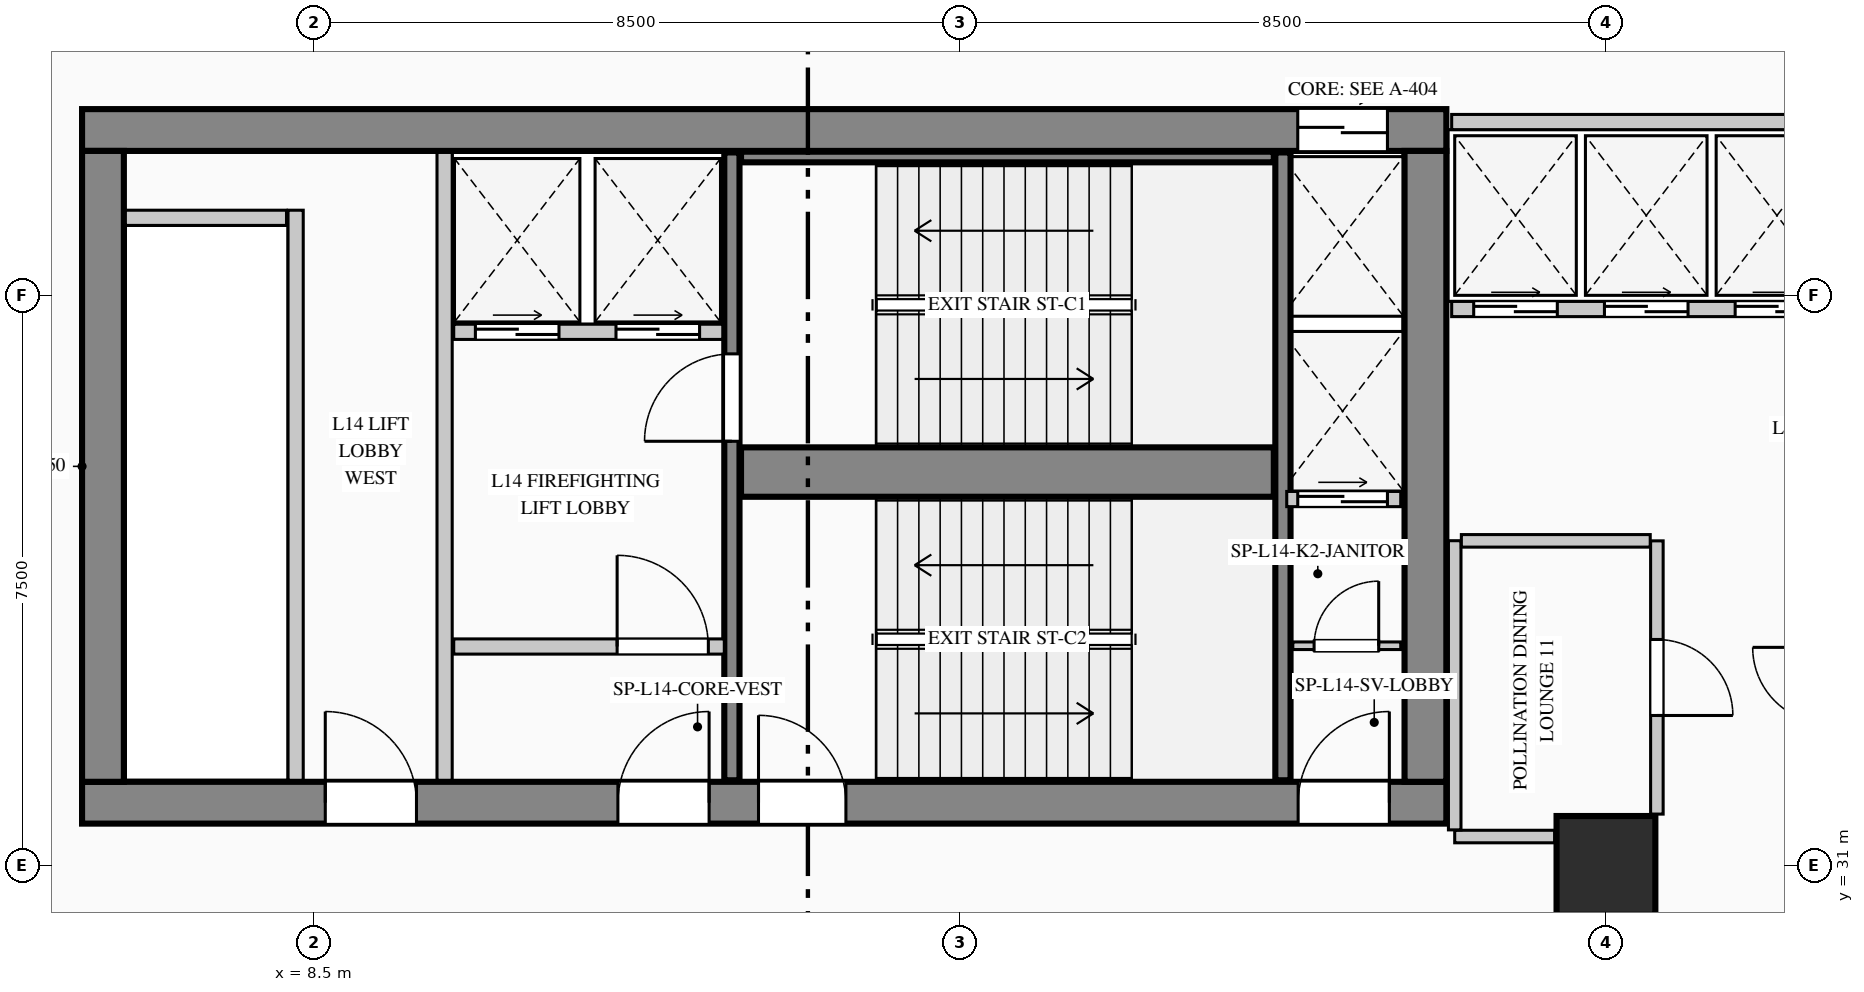
"""IFC4 building model, lengths in metres.
Left out: names, types, materials, properties, quantities, classifications, styles, units other than length and angle.
Written with IfcOpenShell. Run it as: python <this file> out.ifc"""

import sys

from ifc_helpers import new_model, si_unit, direction, frame, frame_2d, origin, origin_2d, place, context, subcontext, project, spatial, rectangle, extrude, element, fill, save


model = new_model("IFC4")
c1 = context("Model", 3, precision=1e-05, world=origin(), true_north=direction((0.0, 1.0)))
c2 = subcontext(c1, "Body", "Model", "MODEL_VIEW")
j1 = project(units=[si_unit("LENGTHUNIT", "METRE"), si_unit("PLANEANGLEUNIT", "RADIAN")], contexts=[c1])
p1 = place(None, origin())
s1 = spatial("IfcSite", under=j1, at=p1, CompositionType="ELEMENT")
p2 = place(p1, origin())
s2 = spatial("IfcBuilding", under=s1, at=p2, CompositionType="ELEMENT")
p3 = place(p2, frame((0.0, 0.0, 62.2)))
s3 = spatial("IfcBuildingStorey", under=s2, at=p3, CompositionType="ELEMENT", Elevation=62.2)
p4 = place(p3, frame((5.45, 40.675, 0.0), z_axis=(0.0, 0.0, 1.0), x_axis=(1.0, 0.0, 0.0)))
e1 = element("IfcWall", 1, at=p4, inside=s3, PredefinedType="SHEAR", context=c2, shape_type="SweptSolid", body=[
    extrude(rectangle(XDim=17.95, YDim=0.55, at=frame_2d((8.975, 0.0))), origin(), (0.0, 0.0, 1.0), 4.4),
])
p5 = place(p4, frame((15.995, 0.0, 0.0)))
e2 = element("IfcOpeningElement", 2, at=p5, cuts=e1, PredefinedType="OPENING", context=c2, shape_type="SweptSolid", body=[
    extrude(rectangle(XDim=1.18, YDim=2.25, at=frame_2d((0.59, 1.125))), frame((0.0, 0.285, 0.0), z_axis=(0.0, -1.0, 0.0), x_axis=(1.0, 0.0, 0.0)), (0.0, 0.0, 1.0), 0.57),
])
p6 = place(p3, frame((5.45, 31.825, 0.0), z_axis=(0.0, 0.0, 1.0), x_axis=(1.0, 0.0, 0.0)))
e3 = element("IfcWall", 3, at=p6, inside=s3, PredefinedType="SHEAR", context=c2, shape_type="SweptSolid", body=[
    extrude(rectangle(XDim=17.95, YDim=0.55, at=frame_2d((8.975, 0.0))), origin(), (0.0, 0.0, 1.0), 4.4),
])
p7 = place(p6, frame((3.2, 0.0, 0.0)))
e4 = element("IfcOpeningElement", 4, at=p7, cuts=e3, PredefinedType="OPENING", context=c2, shape_type="SweptSolid", body=[
    extrude(rectangle(XDim=1.2, YDim=2.2, at=frame_2d((0.6, 1.1))), frame((0.0, 0.285, 0.0), z_axis=(0.0, -1.0, 0.0), x_axis=(1.0, 0.0, 0.0)), (0.0, 0.0, 1.0), 0.57),
])
p8 = place(p6, frame((7.05, 0.0, 0.0)))
e5 = element("IfcOpeningElement", 5, at=p8, cuts=e3, PredefinedType="OPENING", context=c2, shape_type="SweptSolid", body=[
    extrude(rectangle(XDim=1.2, YDim=2.2, at=frame_2d((0.6, 1.1))), frame((0.0, 0.285, 0.0), z_axis=(0.0, -1.0, 0.0), x_axis=(1.0, 0.0, 0.0)), (0.0, 0.0, 1.0), 0.57),
])
p9 = place(p6, frame((8.9, 0.0, 0.0)))
e6 = element("IfcOpeningElement", 6, at=p9, cuts=e3, PredefinedType="OPENING", context=c2, shape_type="SweptSolid", body=[
    extrude(rectangle(XDim=1.15, YDim=2.2, at=frame_2d((0.575, 1.1))), frame((0.0, 0.285, 0.0), z_axis=(0.0, -1.0, 0.0), x_axis=(1.0, 0.0, 0.0)), (0.0, 0.0, 1.0), 0.57),
])
p10 = place(p6, frame((16.0, 0.0, 0.0)))
e7 = element("IfcOpeningElement", 7, at=p10, cuts=e3, PredefinedType="OPENING", context=c2, shape_type="SweptSolid", body=[
    extrude(rectangle(XDim=1.2, YDim=2.2, at=frame_2d((0.6, 1.1))), frame((0.0, 0.285, 0.0), z_axis=(0.0, -1.0, 0.0), x_axis=(1.0, 0.0, 0.0)), (0.0, 0.0, 1.0), 0.57),
])
for number, where, z_axis, x_axis in (
    (8, (5.725, 32.1, 0.0), (0.0, 0.0, 1.0), (0.0, 1.0, 0.0)),
    (9, (23.125, 32.1, 0.0), (0.0, 0.0, 1.0), (0.0, 1.0, 0.0)),
):
    element("IfcWall", number, at=place(p3, frame(where, z_axis=z_axis, x_axis=x_axis)), inside=s3, PredefinedType="SHEAR", context=c2, shape_type="SweptSolid", body=[
        extrude(rectangle(XDim=8.3, YDim=0.55, at=frame_2d((4.15, 0.0))), origin(), (0.0, 0.0, 1.0), 4.4),
    ])
p11 = place(p3, frame((14.0, 32.12, 0.0), z_axis=(0.0, 0.0, 1.0), x_axis=(0.0, 1.0, 0.0)))
e10 = element("IfcWall", 10, at=p11, inside=s3, PredefinedType="SHEAR", context=c2, shape_type="SweptSolid", body=[
    extrude(rectangle(XDim=8.26, YDim=0.2, at=frame_2d((4.13, 0.0))), origin(), (0.0, 0.0, 1.0), 4.4),
])
p12 = place(p11, frame((4.46, 0.0, 0.0)))
e11 = element("IfcOpeningElement", 11, at=p12, cuts=e10, PredefinedType="OPENING", context=c2, shape_type="SweptSolid", body=[
    extrude(rectangle(XDim=1.15, YDim=2.2, at=frame_2d((0.575, 1.1))), frame((0.0, 0.11, 0.0), z_axis=(0.0, -1.0, 0.0), x_axis=(1.0, 0.0, 0.0)), (0.0, 0.0, 1.0), 0.22),
])
p13 = place(p3, frame((14.12, 36.175, 0.0), z_axis=(0.0, 0.0, 1.0), x_axis=(1.0, 0.0, 0.0)))
e12 = element("IfcWall", 12, at=p13, inside=s3, PredefinedType="SHEAR", context=c2, shape_type="SweptSolid", body=[
    extrude(rectangle(XDim=7.01, YDim=0.65, at=frame_2d((3.505, 0.0))), origin(), (0.0, 0.0, 1.0), 4.4),
])
p14 = place(p3, frame((21.25, 32.12, 0.0), z_axis=(0.0, 0.0, 1.0), x_axis=(0.0, 1.0, 0.0)))
e13 = element("IfcWall", 13, at=p14, inside=s3, PredefinedType="SHEAR", context=c2, shape_type="SweptSolid", body=[
    extrude(rectangle(XDim=8.26, YDim=0.2, at=frame_2d((4.13, 0.0))), origin(), (0.0, 0.0, 1.0), 4.4),
])
p15 = place(p3, frame((14.12, 40.32, 0.0), z_axis=(0.0, 0.0, 1.0), x_axis=(1.0, 0.0, 0.0)))
e14 = element("IfcWall", 14, at=p15, inside=s3, PredefinedType="SHEAR", context=c2, shape_type="SweptSolid", body=[
    extrude(rectangle(XDim=7.01, YDim=0.14, at=frame_2d((3.505, 0.0))), origin(), (0.0, 0.0, 1.0), 4.4),
])
p16 = place(p3, frame((25.5, 31.0, 0.0), z_axis=(0.0, 0.0, 1.0), x_axis=(1.0, 0.0, 0.0)))
e15 = element("IfcColumn", 15, at=p16, inside=s3, PredefinedType="COLUMN", context=c2, shape_type="SweptSolid", body=[
    extrude(rectangle(XDim=1.3, YDim=1.3, at=origin_2d()), origin(), (0.0, 0.0, 1.0), 4.4),
])
p17 = place(p3, frame((8.523, 4.84, 0.0), z_axis=(0.0, 0.0, 1.0), x_axis=(-0.150394554312, 0.988626055712, 0.0)))
e16 = element("IfcWall", 16, at=p17, inside=s3, PredefinedType="STANDARD", context=c2, shape_type="SweptSolid", body=[
    extrude(rectangle(XDim=36.738, YDim=0.28, at=frame_2d((18.369, 0.0))), origin(), (0.0, 0.0, 1.0), 4.1),
])
p18 = place(p17, frame((22.762, 0.0, 0.9)))
e17 = element("IfcOpeningElement", 17, at=p18, cuts=e16, PredefinedType="OPENING", context=c2, shape_type="SweptSolid", body=[
    extrude(rectangle(XDim=1.5, YDim=1.8, at=frame_2d((0.75, 0.9))), frame((0.0, 0.15, 0.0), z_axis=(0.0, -1.0, 0.0), x_axis=(1.0, 0.0, 0.0)), (0.0, 0.0, 1.0), 0.3),
])
p19 = place(p3, frame((8.26, 32.12, 0.0), z_axis=(0.0, 0.0, 1.0), x_axis=(0.0, 1.0, 0.0)))
e18 = element("IfcWall", 18, at=p19, inside=s3, PredefinedType="PARTITIONING", context=c2, shape_type="SweptSolid", body=[
    extrude(rectangle(XDim=7.5, YDim=0.2, at=frame_2d((3.75, 0.0))), origin(), (0.0, 0.0, 1.0), 4.1),
])
p20 = place(p3, frame((6.02, 39.52, 0.0), z_axis=(0.0, 0.0, 1.0), x_axis=(1.0, 0.0, 0.0)))
e19 = element("IfcWall", 19, at=p20, inside=s3, PredefinedType="PARTITIONING", context=c2, shape_type="SweptSolid", body=[
    extrude(rectangle(XDim=2.12, YDim=0.2, at=frame_2d((1.06, 0.0))), origin(), (0.0, 0.0, 1.0), 4.1),
])
p21 = place(p3, frame((10.22, 32.12, 0.0), z_axis=(0.0, 0.0, 1.0), x_axis=(0.0, 1.0, 0.0)))
e20 = element("IfcWall", 20, at=p21, inside=s3, PredefinedType="PARTITIONING", context=c2, shape_type="SweptSolid", body=[
    extrude(rectangle(XDim=8.26, YDim=0.2, at=frame_2d((4.13, 0.0))), origin(), (0.0, 0.0, 1.0), 4.1),
])
p22 = place(p3, frame((10.34, 38.02, 0.0), z_axis=(0.0, 0.0, 1.0), x_axis=(1.0, 0.0, 0.0)))
e21 = element("IfcWall", 21, at=p22, inside=s3, PredefinedType="PARTITIONING", context=c2, shape_type="SweptSolid", body=[
    extrude(rectangle(XDim=3.54, YDim=0.2, at=frame_2d((1.77, 0.0))), origin(), (0.0, 0.0, 1.0), 4.1),
])
p23 = place(p22, frame((0.285, 0.0, 0.0)))
e22 = element("IfcOpeningElement", 22, at=p23, cuts=e21, PredefinedType="OPENING", context=c2, shape_type="SweptSolid", body=[
    extrude(rectangle(XDim=1.1, YDim=2.2, at=frame_2d((0.55, 1.1))), frame((0.0, 0.11, 0.0), z_axis=(0.0, -1.0, 0.0), x_axis=(1.0, 0.0, 0.0)), (0.0, 0.0, 1.0), 0.22),
])
p24 = place(p22, frame((2.135, 0.0, 0.0)))
e23 = element("IfcOpeningElement", 23, at=p24, cuts=e21, PredefinedType="OPENING", context=c2, shape_type="SweptSolid", body=[
    extrude(rectangle(XDim=1.1, YDim=2.2, at=frame_2d((0.55, 1.1))), frame((0.0, 0.11, 0.0), z_axis=(0.0, -1.0, 0.0), x_axis=(1.0, 0.0, 0.0)), (0.0, 0.0, 1.0), 0.22),
])
p25 = place(p3, frame((10.34, 33.88, 0.0), z_axis=(0.0, 0.0, 1.0), x_axis=(1.0, 0.0, 0.0)))
e24 = element("IfcWall", 24, at=p25, inside=s3, PredefinedType="PARTITIONING", context=c2, shape_type="SweptSolid", body=[
    extrude(rectangle(XDim=3.56, YDim=0.2, at=frame_2d((1.78, 0.0))), origin(), (0.0, 0.0, 1.0), 4.1),
])
p26 = place(p25, frame((2.15, 0.0, 0.0)))
e25 = element("IfcOpeningElement", 25, at=p26, cuts=e24, PredefinedType="OPENING", context=c2, shape_type="SweptSolid", body=[
    extrude(rectangle(XDim=1.2, YDim=2.2, at=frame_2d((0.6, 1.1))), frame((0.0, 0.11, 0.0), z_axis=(0.0, -1.0, 0.0), x_axis=(1.0, 0.0, 0.0)), (0.0, 0.0, 1.0), 0.22),
])
p27 = place(p3, frame((21.38, 33.89, 0.0), z_axis=(0.0, 0.0, 1.0), x_axis=(1.0, 0.0, 0.0)))
e26 = element("IfcWall", 26, at=p27, inside=s3, PredefinedType="PARTITIONING", context=c2, shape_type="SweptSolid", body=[
    extrude(rectangle(XDim=1.42, YDim=0.1, at=frame_2d((0.71, 0.0))), origin(), (0.0, 0.0, 1.0), 4.1),
])
p28 = place(p27, frame((0.28, 0.0, 0.0)))
e27 = element("IfcOpeningElement", 27, at=p28, cuts=e26, PredefinedType="OPENING", context=c2, shape_type="SweptSolid", body=[
    extrude(rectangle(XDim=0.85, YDim=2.1, at=frame_2d((0.425, 1.05))), frame((0.0, 0.06, 0.0), z_axis=(0.0, -1.0, 0.0), x_axis=(1.0, 0.0, 0.0)), (0.0, 0.0, 1.0), 0.12),
])
p29 = place(p3, frame((21.3, 35.82, 0.0), z_axis=(0.0, 0.0, 1.0), x_axis=(1.0, 0.0, 0.0)))
e28 = element("IfcWall", 28, at=p29, inside=s3, PredefinedType="PARTITIONING", context=c2, shape_type="SweptSolid", body=[
    extrude(rectangle(XDim=1.5, YDim=0.2, at=frame_2d((0.75, 0.0))), origin(), (0.0, 0.0, 1.0), 4.1),
])
p30 = place(p29, frame((0.145, 0.0, 0.0)))
e29 = element("IfcOpeningElement", 29, at=p30, cuts=e28, PredefinedType="OPENING", context=c2, shape_type="SweptSolid", body=[
    extrude(rectangle(XDim=1.18, YDim=2.25, at=frame_2d((0.59, 1.125))), frame((0.0, 0.11, 0.0), z_axis=(0.0, -1.0, 0.0), x_axis=(1.0, 0.0, 0.0)), (0.0, 0.0, 1.0), 0.22),
])
p31 = place(p3, frame((23.47, 40.78, 0.0), z_axis=(0.0, 0.0, 1.0), x_axis=(1.0, 0.0, 0.0)))
e30 = element("IfcWall", 30, at=p31, inside=s3, PredefinedType="PARTITIONING", context=c2, shape_type="SweptSolid", body=[
    extrude(rectangle(XDim=6.91, YDim=0.2, at=frame_2d((3.455, 0.0))), origin(), (0.0, 0.0, 1.0), 4.1),
])
p32 = place(p3, frame((23.47, 38.32, 0.0), z_axis=(0.0, 0.0, 1.0), x_axis=(1.0, 0.0, 0.0)))
e31 = element("IfcWall", 31, at=p32, inside=s3, PredefinedType="PARTITIONING", context=c2, shape_type="SweptSolid", body=[
    extrude(rectangle(XDim=6.79, YDim=0.2, at=frame_2d((3.395, 0.0))), origin(), (0.0, 0.0, 1.0), 4.1),
])
p33 = place(p32, frame((0.29, 0.0, 0.0)))
e32 = element("IfcOpeningElement", 32, at=p33, cuts=e31, PredefinedType="OPENING", context=c2, shape_type="SweptSolid", body=[
    extrude(rectangle(XDim=1.1, YDim=2.2, at=frame_2d((0.55, 1.1))), frame((0.0, 0.11, 0.0), z_axis=(0.0, -1.0, 0.0), x_axis=(1.0, 0.0, 0.0)), (0.0, 0.0, 1.0), 0.22),
])
p34 = place(p32, frame((2.01, 0.0, 0.0)))
e33 = element("IfcOpeningElement", 33, at=p34, cuts=e31, PredefinedType="OPENING", context=c2, shape_type="SweptSolid", body=[
    extrude(rectangle(XDim=1.1, YDim=2.2, at=frame_2d((0.55, 1.1))), frame((0.0, 0.11, 0.0), z_axis=(0.0, -1.0, 0.0), x_axis=(1.0, 0.0, 0.0)), (0.0, 0.0, 1.0), 0.22),
])
p35 = place(p32, frame((3.73, 0.0, 0.0)))
e34 = element("IfcOpeningElement", 34, at=p35, cuts=e31, PredefinedType="OPENING", context=c2, shape_type="SweptSolid", body=[
    extrude(rectangle(XDim=1.1, YDim=2.2, at=frame_2d((0.55, 1.1))), frame((0.0, 0.11, 0.0), z_axis=(0.0, -1.0, 0.0), x_axis=(1.0, 0.0, 0.0)), (0.0, 0.0, 1.0), 0.22),
])
p36 = place(p32, frame((5.45, 0.0, 0.0)))
e35 = element("IfcOpeningElement", 35, at=p36, cuts=e31, PredefinedType="OPENING", context=c2, shape_type="SweptSolid", body=[
    extrude(rectangle(XDim=1.1, YDim=2.2, at=frame_2d((0.55, 1.1))), frame((0.0, 0.11, 0.0), z_axis=(0.0, -1.0, 0.0), x_axis=(1.0, 0.0, 0.0)), (0.0, 0.0, 1.0), 0.22),
])
p37 = place(p3, frame((26.17, 35.27, 0.0), z_axis=(0.0, 0.0, 1.0), x_axis=(0.0, -1.0, 0.0)))
e36 = element("IfcWall", 36, at=p37, inside=s3, PredefinedType="PARTITIONING", context=c2, shape_type="SweptSolid", body=[
    extrude(rectangle(XDim=3.595, YDim=0.165, at=frame_2d((1.797, 0.0))), origin(), (0.0, 0.0, 1.0), 4.1),
])
p38 = place(p37, frame((1.298, 0.0, 0.0)))
e37 = element("IfcOpeningElement", 37, at=p38, cuts=e36, PredefinedType="OPENING", context=c2, shape_type="SweptSolid", body=[
    extrude(rectangle(XDim=1.0, YDim=2.15, at=frame_2d((0.5, 1.075))), frame((0.0, 0.093, 0.0), z_axis=(0.0, -1.0, 0.0), x_axis=(1.0, 0.0, 0.0)), (0.0, 0.0, 1.0), 0.185),
])
p39 = place(p3, frame((24.825, 31.38, 0.0), z_axis=(0.0, 0.0, 1.0), x_axis=(-1.0, 0.0, 0.0)))
e38 = element("IfcWall", 38, at=p39, inside=s3, PredefinedType="PARTITIONING", context=c2, shape_type="SweptSolid", body=[
    extrude(rectangle(XDim=1.315, YDim=0.165, at=frame_2d((0.657, 0.0))), origin(), (0.0, 0.0, 1.0), 4.1),
])
p40 = place(p3, frame((23.51, 31.468, 0.0), z_axis=(0.0, 0.0, 1.0), x_axis=(0.0, 1.0, 0.0)))
e39 = element("IfcWall", 39, at=p40, inside=s3, PredefinedType="PARTITIONING", context=c2, shape_type="SweptSolid", body=[
    extrude(rectangle(XDim=3.804, YDim=0.165, at=frame_2d((1.902, 0.0))), origin(), (0.0, 0.0, 1.0), 4.1),
])
p41 = place(p3, frame((23.597, 35.27, 0.0), z_axis=(0.0, 0.0, 1.0), x_axis=(1.0, 0.0, 0.0)))
e40 = element("IfcWall", 40, at=p41, inside=s3, PredefinedType="PARTITIONING", context=c2, shape_type="SweptSolid", body=[
    extrude(rectangle(XDim=2.485, YDim=0.165, at=frame_2d((1.243, 0.0))), origin(), (0.0, 0.0, 1.0), 4.1),
])
p42 = place(p7, origin())
e41 = element("IfcDoor", 41, at=p42, inside=s3, OperationType="SINGLE_SWING_LEFT", PredefinedType="DOOR", context=c2, shape_type="SweptSolid", body=[
    extrude(rectangle(XDim=1.2, YDim=2.2, at=frame_2d((0.6, 1.1))), frame((0.0, 0.025, 0.0), z_axis=(0.0, -1.0, 0.0), x_axis=(1.0, 0.0, 0.0)), (0.0, 0.0, 1.0), 0.05),
])
fill(e4, e41)
p43 = place(p8, origin())
e42 = element("IfcDoor", 42, at=p43, inside=s3, OperationType="SINGLE_SWING_RIGHT", PredefinedType="DOOR", context=c2, shape_type="SweptSolid", body=[
    extrude(rectangle(XDim=1.2, YDim=2.2, at=frame_2d((0.6, 1.1))), frame((0.0, 0.025, 0.0), z_axis=(0.0, -1.0, 0.0), x_axis=(1.0, 0.0, 0.0)), (0.0, 0.0, 1.0), 0.05),
])
fill(e5, e42)
p44 = place(p9, origin())
e43 = element("IfcDoor", 43, at=p44, inside=s3, OperationType="SINGLE_SWING_LEFT", PredefinedType="DOOR", context=c2, shape_type="SweptSolid", body=[
    extrude(rectangle(XDim=1.15, YDim=2.2, at=frame_2d((0.575, 1.1))), frame((0.0, 0.025, 0.0), z_axis=(0.0, -1.0, 0.0), x_axis=(1.0, 0.0, 0.0)), (0.0, 0.0, 1.0), 0.05),
])
fill(e6, e43)
p45 = place(p10, origin())
e44 = element("IfcDoor", 44, at=p45, inside=s3, OperationType="SINGLE_SWING_RIGHT", PredefinedType="DOOR", context=c2, shape_type="SweptSolid", body=[
    extrude(rectangle(XDim=1.2, YDim=2.2, at=frame_2d((0.6, 1.1))), frame((0.0, 0.025, 0.0), z_axis=(0.0, -1.0, 0.0), x_axis=(1.0, 0.0, 0.0)), (0.0, 0.0, 1.0), 0.05),
])
fill(e7, e44)
p46 = place(p26, origin())
e45 = element("IfcDoor", 45, at=p46, inside=s3, OperationType="SINGLE_SWING_LEFT", PredefinedType="DOOR", context=c2, shape_type="SweptSolid", body=[
    extrude(rectangle(XDim=1.2, YDim=2.2, at=frame_2d((0.6, 1.1))), frame((0.0, 0.025, 0.0), z_axis=(0.0, -1.0, 0.0), x_axis=(1.0, 0.0, 0.0)), (0.0, 0.0, 1.0), 0.05),
])
fill(e25, e45)
p47 = place(p28, origin())
e46 = element("IfcDoor", 46, at=p47, inside=s3, OperationType="SINGLE_SWING_RIGHT", PredefinedType="DOOR", context=c2, shape_type="SweptSolid", body=[
    extrude(rectangle(XDim=0.85, YDim=2.1, at=frame_2d((0.425, 1.05))), frame((0.0, 0.025, 0.0), z_axis=(0.0, -1.0, 0.0), x_axis=(1.0, 0.0, 0.0)), (0.0, 0.0, 1.0), 0.05),
])
fill(e27, e46)
p48 = place(p12, origin())
e47 = element("IfcDoor", 47, at=p48, inside=s3, OperationType="SINGLE_SWING_LEFT", PredefinedType="DOOR", context=c2, shape_type="SweptSolid", body=[
    extrude(rectangle(XDim=1.15, YDim=2.2, at=frame_2d((0.575, 1.1))), frame((0.0, 0.025, 0.0), z_axis=(0.0, -1.0, 0.0), x_axis=(1.0, 0.0, 0.0)), (0.0, 0.0, 1.0), 0.05),
])
fill(e11, e47)
p49 = place(p23, origin())
e48 = element("IfcDoor", 48, at=p49, inside=s3, OperationType="DOUBLE_DOOR_SLIDING", PredefinedType="DOOR", context=c2, shape_type="SweptSolid", body=[
    extrude(rectangle(XDim=1.1, YDim=2.2, at=frame_2d((0.55, 1.1))), frame((0.0, 0.025, 0.0), z_axis=(0.0, -1.0, 0.0), x_axis=(1.0, 0.0, 0.0)), (0.0, 0.0, 1.0), 0.05),
])
fill(e22, e48)
p50 = place(p24, origin())
e49 = element("IfcDoor", 49, at=p50, inside=s3, OperationType="DOUBLE_DOOR_SLIDING", PredefinedType="DOOR", context=c2, shape_type="SweptSolid", body=[
    extrude(rectangle(XDim=1.1, YDim=2.2, at=frame_2d((0.55, 1.1))), frame((0.0, 0.025, 0.0), z_axis=(0.0, -1.0, 0.0), x_axis=(1.0, 0.0, 0.0)), (0.0, 0.0, 1.0), 0.05),
])
fill(e23, e49)
p51 = place(p5, origin())
e50 = element("IfcDoor", 50, at=p51, inside=s3, OperationType="DOUBLE_DOOR_SLIDING", PredefinedType="DOOR", context=c2, shape_type="SweptSolid", body=[
    extrude(rectangle(XDim=1.18, YDim=2.25, at=frame_2d((0.59, 1.125))), frame((0.0, 0.025, 0.0), z_axis=(0.0, -1.0, 0.0), x_axis=(1.0, 0.0, 0.0)), (0.0, 0.0, 1.0), 0.05),
])
fill(e2, e50)
p52 = place(p30, origin())
e51 = element("IfcDoor", 51, at=p52, inside=s3, OperationType="DOUBLE_DOOR_SLIDING", PredefinedType="DOOR", context=c2, shape_type="SweptSolid", body=[
    extrude(rectangle(XDim=1.18, YDim=2.25, at=frame_2d((0.59, 1.125))), frame((0.0, 0.025, 0.0), z_axis=(0.0, -1.0, 0.0), x_axis=(1.0, 0.0, 0.0)), (0.0, 0.0, 1.0), 0.05),
])
fill(e29, e51)
p53 = place(p33, origin())
e52 = element("IfcDoor", 52, at=p53, inside=s3, OperationType="DOUBLE_DOOR_SLIDING", PredefinedType="DOOR", context=c2, shape_type="SweptSolid", body=[
    extrude(rectangle(XDim=1.1, YDim=2.2, at=frame_2d((0.55, 1.1))), frame((0.0, 0.025, 0.0), z_axis=(0.0, -1.0, 0.0), x_axis=(1.0, 0.0, 0.0)), (0.0, 0.0, 1.0), 0.05),
])
fill(e32, e52)
p54 = place(p34, origin())
e53 = element("IfcDoor", 53, at=p54, inside=s3, OperationType="DOUBLE_DOOR_SLIDING", PredefinedType="DOOR", context=c2, shape_type="SweptSolid", body=[
    extrude(rectangle(XDim=1.1, YDim=2.2, at=frame_2d((0.55, 1.1))), frame((0.0, 0.025, 0.0), z_axis=(0.0, -1.0, 0.0), x_axis=(1.0, 0.0, 0.0)), (0.0, 0.0, 1.0), 0.05),
])
fill(e33, e53)
p55 = place(p35, origin())
e54 = element("IfcDoor", 54, at=p55, inside=s3, OperationType="DOUBLE_DOOR_SLIDING", PredefinedType="DOOR", context=c2, shape_type="SweptSolid", body=[
    extrude(rectangle(XDim=1.1, YDim=2.2, at=frame_2d((0.55, 1.1))), frame((0.0, 0.025, 0.0), z_axis=(0.0, -1.0, 0.0), x_axis=(1.0, 0.0, 0.0)), (0.0, 0.0, 1.0), 0.05),
])
fill(e34, e54)
p56 = place(p38, origin())
e55 = element("IfcDoor", 55, at=p56, inside=s3, OperationType="SINGLE_SWING_RIGHT", PredefinedType="DOOR", context=c2, shape_type="SweptSolid", body=[
    extrude(rectangle(XDim=1.0, YDim=2.15, at=frame_2d((0.5, 1.075))), frame((0.0, 0.025, 0.0), z_axis=(0.0, -1.0, 0.0), x_axis=(1.0, 0.0, 0.0)), (0.0, 0.0, 1.0), 0.05),
])
fill(e37, e55)
save(model, sys.argv[1])
